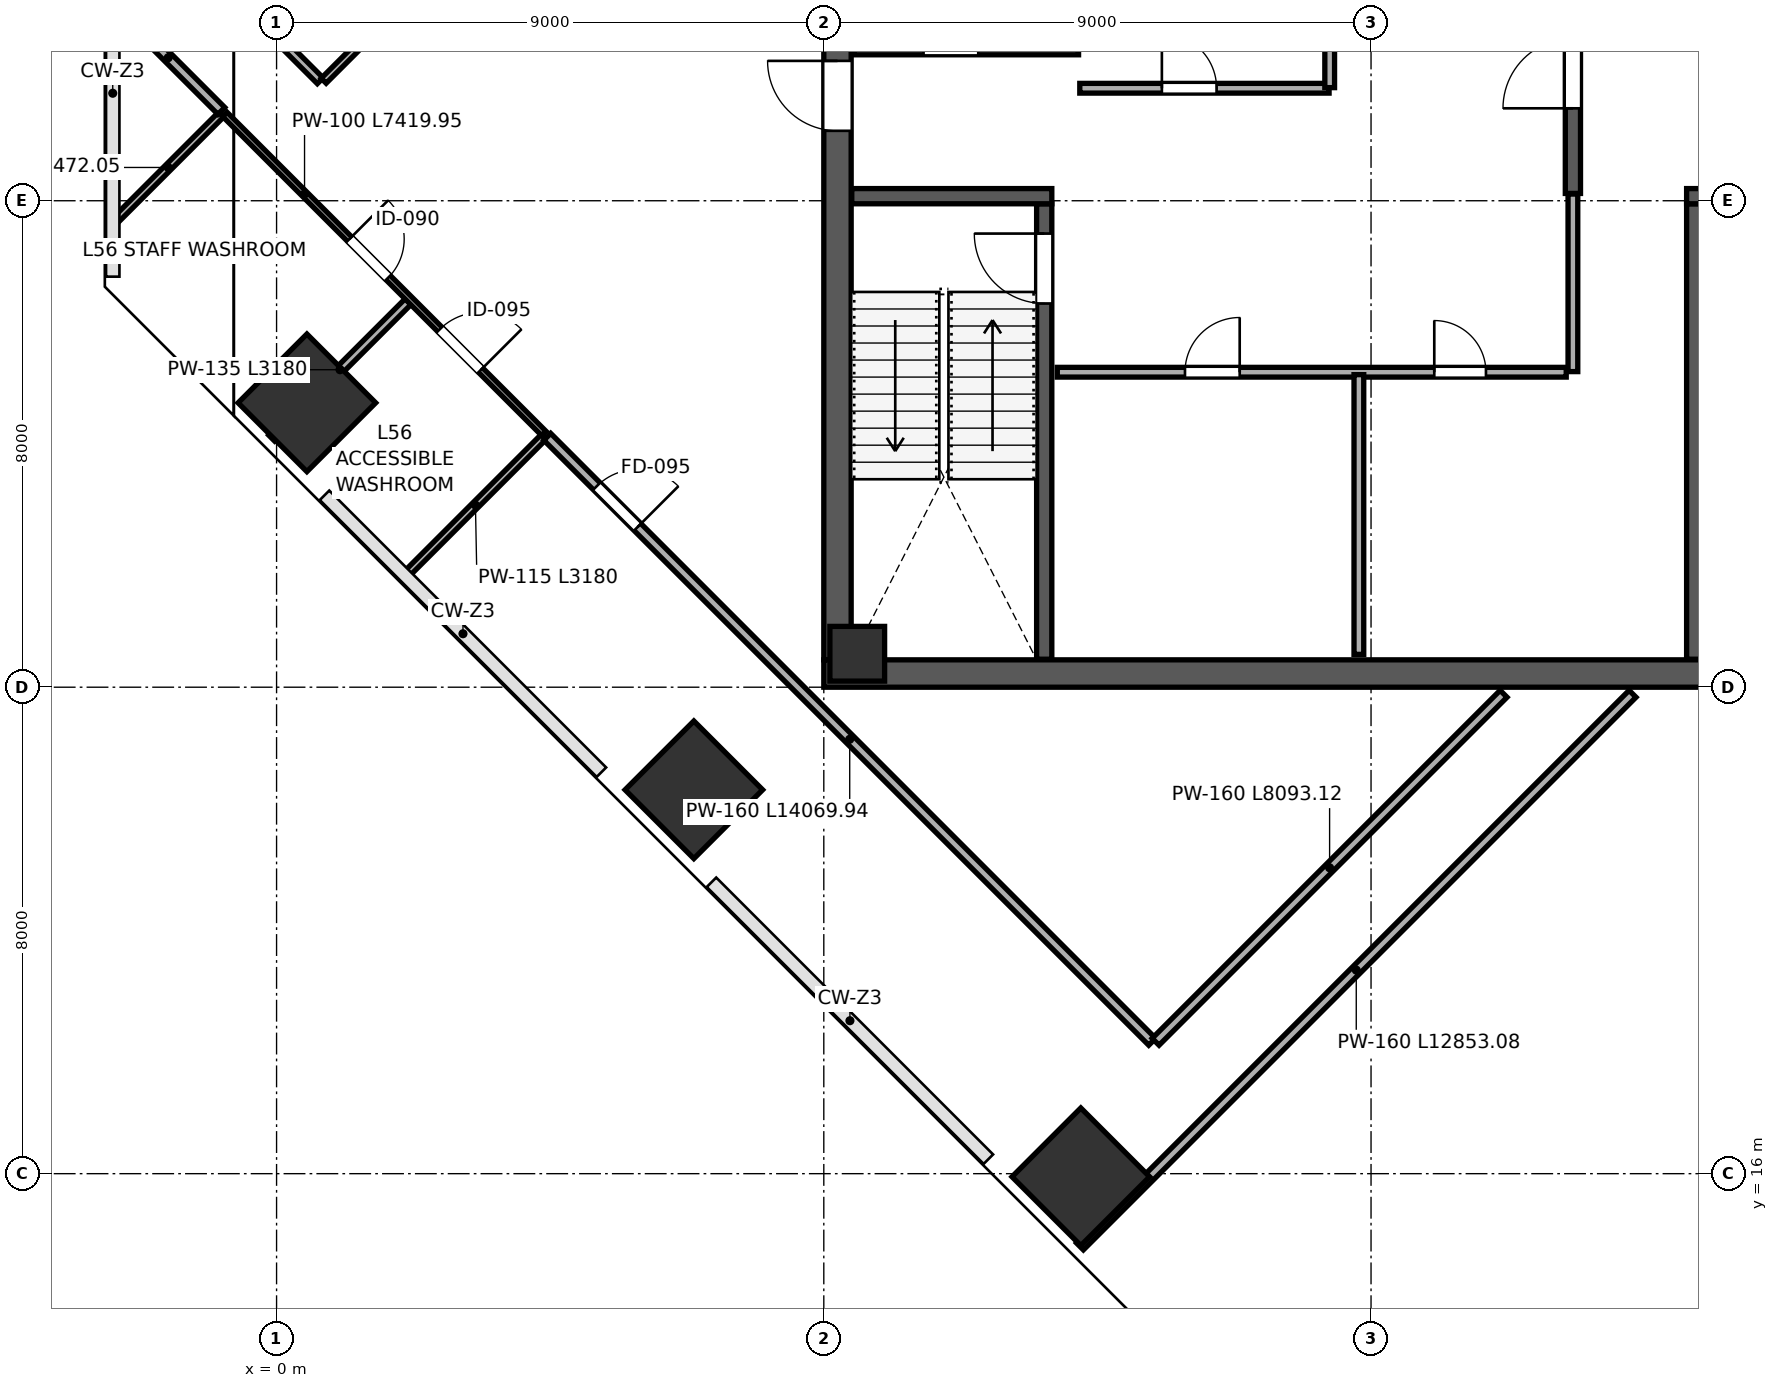
"""IFC4 building model, lengths in metres.
Left out: names, types, materials, properties, quantities, classifications, styles, units other than length and angle.
Written with IfcOpenShell. Run it as: python <this file> out.ifc"""

import sys

from ifc_helpers import new_model, si_unit, direction, frame, frame_2d, origin, origin_2d, place, context, subcontext, project, spatial, rectangle, extrude, source, transform, mapped, element, fill, save


model = new_model("IFC4")
c1 = context("Model", 3, precision=1e-05, world=origin(), true_north=direction((0.0, 1.0)))
c2 = subcontext(c1, "Body", "Model", "MODEL_VIEW")
j1 = project(units=[si_unit("LENGTHUNIT", "METRE"), si_unit("PLANEANGLEUNIT", "RADIAN")], contexts=[c1])
p1 = place(None, origin())
s1 = spatial("IfcSite", under=j1, at=p1, CompositionType="ELEMENT")
p2 = place(p1, origin())
s2 = spatial("IfcBuilding", under=s1, at=p2, CompositionType="ELEMENT")
p3 = place(p2, frame((0.0, 0.0, 250.0)))
s3 = spatial("IfcBuildingStorey", under=s2, at=p3, CompositionType="ELEMENT", Elevation=250.0)
m1 = source(origin(), c2, "Body", "SweptSolid", [
    extrude(rectangle(XDim=0.9, YDim=0.9, at=origin_2d()), origin(), (0.0, 0.0, 1.0), 4.198),
])
p4 = place(p3, frame((9.55, 24.55, 0.001), z_axis=(0.0, 0.0, 1.0), x_axis=(1.0, 0.0, 0.0)))
e1 = element("IfcColumn", 1, at=p4, inside=s3, PredefinedType="COLUMN", context=c2, shape_type="MappedRepresentation", body=[
    mapped(m1, transform((0.0, 0.0, 0.0), scale=1.0)),
])
m2 = source(origin(), c2, "Body", "SweptSolid", [
    extrude(rectangle(XDim=1.6, YDim=1.6, at=origin_2d()), origin(), (0.0, 0.0, 1.0), 4.198),
])
for number, where, z_axis, x_axis in (
    (2, (0.499, 28.677, 0.001), (0.0, 0.0, 1.0), (-0.707, 0.707, 0.0)),
    (3, (6.863, 22.312, 0.001), (0.0, 0.0, 1.0), (-0.707, 0.707, 0.0)),
    (4, (13.227, 15.949, 0.001), (0.0, 0.0, 1.0), (-0.707, 0.707, 0.0)),
):
    element("IfcColumn", number, at=place(p3, frame(where, z_axis=z_axis, x_axis=x_axis)), inside=s3, PredefinedType="COLUMN", context=c2, shape_type="MappedRepresentation", body=[
        mapped(m2, transform((0.0, 0.0, 0.0), scale=1.0)),
    ])
p5 = place(p3, frame((9.225, 24.45, 0.0), z_axis=(0.0, 0.0, 1.0), x_axis=(0.0, 1.0, 0.0)))
e5 = element("IfcWall", 5, at=p5, inside=s3, PredefinedType="SHEAR", context=c2, shape_type="SweptSolid", body=[
    extrude(rectangle(XDim=15.1, YDim=0.45, at=frame_2d((7.55, 0.0))), origin(), (0.0, 0.0, 1.0), 3.96),
])
p6 = place(p5, frame((8.7, 0.0, 0.0)))
e6 = element("IfcOpeningElement", 6, at=p6, cuts=e5, PredefinedType="OPENING", context=c2, shape_type="SweptSolid", body=[
    extrude(rectangle(XDim=1.15, YDim=2.2, at=frame_2d((0.575, 1.1))), frame((0.0, 0.235, 0.0), z_axis=(0.0, -1.0, 0.0), x_axis=(1.0, 0.0, 0.0)), (0.0, 0.0, 1.0), 0.47),
])
p7 = place(p3, frame((9.0, 24.225, 0.0), z_axis=(0.0, 0.0, 1.0), x_axis=(1.0, 0.0, 0.0)))
e7 = element("IfcWall", 7, at=p7, inside=s3, PredefinedType="SHEAR", context=c2, shape_type="SweptSolid", body=[
    extrude(rectangle(XDim=18.0, YDim=0.45, at=frame_2d((9.0, 0.0))), origin(), (0.0, 0.0, 1.0), 3.96),
])
p8 = place(p3, frame((12.625, 24.46, 0.0), z_axis=(0.0, 0.0, 1.0), x_axis=(0.0, 1.0, 0.0)))
e8 = element("IfcWall", 8, at=p8, inside=s3, PredefinedType="SHEAR", context=c2, shape_type="SweptSolid", body=[
    extrude(rectangle(XDim=7.49, YDim=0.25, at=frame_2d((3.745, 0.0))), origin(), (0.0, 0.0, 1.0), 3.96),
])
p9 = place(p8, frame((5.85, 0.0, 0.0)))
e9 = element("IfcOpeningElement", 9, at=p9, cuts=e8, PredefinedType="OPENING", context=c2, shape_type="SweptSolid", body=[
    extrude(rectangle(XDim=1.15, YDim=2.2, at=frame_2d((0.575, 1.1))), frame((0.0, 0.135, 0.0), z_axis=(0.0, -1.0, 0.0), x_axis=(1.0, 0.0, 0.0)), (0.0, 0.0, 1.0), 0.27),
])
p10 = place(p3, frame((9.46, 32.075, 0.0), z_axis=(0.0, 0.0, 1.0), x_axis=(1.0, 0.0, 0.0)))
e10 = element("IfcWall", 10, at=p10, inside=s3, PredefinedType="SHEAR", context=c2, shape_type="SweptSolid", body=[
    extrude(rectangle(XDim=3.29, YDim=0.25, at=frame_2d((1.645, 0.0))), origin(), (0.0, 0.0, 1.0), 3.96),
])
p11 = place(p3, frame((23.315, 24.46, 0.0), z_axis=(0.0, 0.0, 1.0), x_axis=(0.0, 1.0, 0.0)))
e11 = element("IfcWall", 11, at=p11, inside=s3, PredefinedType="SHEAR", context=c2, shape_type="SweptSolid", body=[
    extrude(rectangle(XDim=7.49, YDim=0.25, at=frame_2d((3.745, 0.0))), origin(), (0.0, 0.0, 1.0), 3.96),
])
p12 = place(p3, frame((23.19, 32.075, 0.0), z_axis=(0.0, 0.0, 1.0), x_axis=(1.0, 0.0, 0.0)))
e12 = element("IfcWall", 12, at=p12, inside=s3, PredefinedType="SHEAR", context=c2, shape_type="SweptSolid", body=[
    extrude(rectangle(XDim=3.35, YDim=0.25, at=frame_2d((1.675, 0.0))), origin(), (0.0, 0.0, 1.0), 3.96),
])
p13 = place(p12, frame((0.85, 0.0, 0.0)))
e13 = element("IfcOpeningElement", 13, at=p13, cuts=e12, PredefinedType="OPENING", context=c2, shape_type="SweptSolid", body=[
    extrude(rectangle(XDim=1.15, YDim=2.2, at=frame_2d((0.575, 1.1))), frame((0.0, 0.135, 0.0), z_axis=(0.0, -1.0, 0.0), x_axis=(1.0, 0.0, 0.0)), (0.0, 0.0, 1.0), 0.27),
])
p14 = place(p3, frame((21.32, 32.12, 0.0), z_axis=(0.0, 0.0, 1.0), x_axis=(0.0, 1.0, 0.0)))
e14 = element("IfcWall", 14, at=p14, inside=s3, PredefinedType="SHEAR", context=c2, shape_type="SweptSolid", body=[
    extrude(rectangle(XDim=7.42, YDim=0.25, at=frame_2d((3.71, 0.0))), origin(), (0.0, 0.0, 1.0), 3.96),
])
p15 = place(p14, frame((1.4, 0.0, 0.0)))
e15 = element("IfcOpeningElement", 15, at=p15, cuts=e14, PredefinedType="OPENING", context=c2, shape_type="SweptSolid", body=[
    extrude(rectangle(XDim=1.15, YDim=2.2, at=frame_2d((0.575, 1.1))), frame((0.0, 0.135, 0.0), z_axis=(0.0, -1.0, 0.0), x_axis=(1.0, 0.0, 0.0)), (0.0, 0.0, 1.0), 0.27),
])
p16 = place(p3, frame((9.49, 34.48, 0.0), z_axis=(0.0, 0.0, 1.0), x_axis=(1.0, 0.0, 0.0)))
e16 = element("IfcWall", 16, at=p16, inside=s3, PredefinedType="PARTITIONING", context=c2, shape_type="SweptSolid", body=[
    extrude(rectangle(XDim=3.7, YDim=0.16, at=frame_2d((1.85, 0.0))), origin(), (0.0, 0.0, 1.0), 3.96),
])
p17 = place(p16, frame((1.15, 0.0, 0.0)))
e17 = element("IfcOpeningElement", 17, at=p17, cuts=e16, PredefinedType="OPENING", context=c2, shape_type="SweptSolid", body=[
    extrude(rectangle(XDim=0.9, YDim=2.15, at=frame_2d((0.45, 1.075))), frame((0.0, 0.09, 0.0), z_axis=(0.0, -1.0, 0.0), x_axis=(1.0, 0.0, 0.0)), (0.0, 0.0, 1.0), 0.18),
])
p18 = place(p3, frame((13.21, 33.85, 0.0), z_axis=(0.0, 0.0, 1.0), x_axis=(1.0, 0.0, 0.0)))
e18 = element("IfcWall", 18, at=p18, inside=s3, PredefinedType="PARTITIONING", context=c2, shape_type="SweptSolid", body=[
    extrude(rectangle(XDim=4.1, YDim=0.16, at=frame_2d((2.05, 0.0))), origin(), (0.0, 0.0, 1.0), 3.96),
])
p19 = place(p18, frame((1.35, 0.0, 0.0)))
e19 = element("IfcOpeningElement", 19, at=p19, cuts=e18, PredefinedType="OPENING", context=c2, shape_type="SweptSolid", body=[
    extrude(rectangle(XDim=0.9, YDim=2.15, at=frame_2d((0.45, 1.075))), frame((0.0, 0.09, 0.0), z_axis=(0.0, -1.0, 0.0), x_axis=(1.0, 0.0, 0.0)), (0.0, 0.0, 1.0), 0.18),
])
p20 = place(p3, frame((17.32, 33.86, 0.0), z_axis=(0.0, 0.0, 1.0), x_axis=(0.0, 1.0, 0.0)))
e20 = element("IfcWall", 20, at=p20, inside=s3, PredefinedType="PARTITIONING", context=c2, shape_type="SweptSolid", body=[
    extrude(rectangle(XDim=1.93, YDim=0.16, at=frame_2d((0.965, 0.0))), origin(), (0.0, 0.0, 1.0), 3.96),
])
p21 = place(p3, frame((12.84, 29.18, 0.0), z_axis=(0.0, 0.0, 1.0), x_axis=(1.0, 0.0, 0.0)))
e21 = element("IfcWall", 21, at=p21, inside=s3, PredefinedType="PARTITIONING", context=c2, shape_type="SweptSolid", body=[
    extrude(rectangle(XDim=8.37, YDim=0.16, at=frame_2d((4.185, 0.0))), origin(), (0.0, 0.0, 1.0), 3.96),
])
p22 = place(p21, frame((2.1, 0.0, 0.0)))
e22 = element("IfcOpeningElement", 22, at=p22, cuts=e21, PredefinedType="OPENING", context=c2, shape_type="SweptSolid", body=[
    extrude(rectangle(XDim=0.9, YDim=2.15, at=frame_2d((0.45, 1.075))), frame((0.0, 0.09, 0.0), z_axis=(0.0, -1.0, 0.0), x_axis=(1.0, 0.0, 0.0)), (0.0, 0.0, 1.0), 0.18),
])
p23 = place(p21, frame((6.2, 0.0, 0.0)))
e23 = element("IfcOpeningElement", 23, at=p23, cuts=e21, PredefinedType="OPENING", context=c2, shape_type="SweptSolid", body=[
    extrude(rectangle(XDim=0.85, YDim=2.1, at=frame_2d((0.425, 1.05))), frame((0.0, 0.09, 0.0), z_axis=(0.0, -1.0, 0.0), x_axis=(1.0, 0.0, 0.0)), (0.0, 0.0, 1.0), 0.18),
])
p24 = place(p3, frame((17.8, 24.54, 0.0), z_axis=(0.0, 0.0, 1.0), x_axis=(0.0, 1.0, 0.0)))
e24 = element("IfcWall", 24, at=p24, inside=s3, PredefinedType="PARTITIONING", context=c2, shape_type="SweptSolid", body=[
    extrude(rectangle(XDim=4.6, YDim=0.16, at=frame_2d((2.3, 0.0))), origin(), (0.0, 0.0, 1.0), 3.96),
])
p25 = place(p3, frame((21.32, 29.19, 0.0), z_axis=(0.0, 0.0, 1.0), x_axis=(0.0, 1.0, 0.0)))
e25 = element("IfcWall", 25, at=p25, inside=s3, PredefinedType="PARTITIONING", context=c2, shape_type="SweptSolid", body=[
    extrude(rectangle(XDim=2.92, YDim=0.16, at=frame_2d((1.46, 0.0))), origin(), (0.0, 0.0, 1.0), 3.96),
])
p26 = place(p3, frame((-2.656, 31.673, 0.0), z_axis=(0.0, 0.0, 1.0), x_axis=(0.707106781187, 0.707106781187, 0.0)))
e26 = element("IfcWall", 26, at=p26, inside=s3, PredefinedType="PARTITIONING", context=c2, shape_type="SweptSolid", body=[
    extrude(rectangle(XDim=2.472, YDim=0.115, at=frame_2d((1.236, 0.0))), origin(), (0.0, 0.0, 1.0), 3.96),
])
p27 = place(p3, frame((-2.656, 35.226, 0.0), z_axis=(0.0, 0.0, 1.0), x_axis=(0.707106781187, -0.707106781187, 0.0)))
e27 = element("IfcWall", 27, at=p27, inside=s3, PredefinedType="PARTITIONING", context=c2, shape_type="SweptSolid", body=[
    extrude(rectangle(XDim=2.472, YDim=0.16, at=frame_2d((1.236, 0.0))), origin(), (0.0, 0.0, 1.0), 3.96),
])
p28 = place(p3, frame((-0.081, 28.097, 0.0), z_axis=(0.0, 0.0, 1.0), x_axis=(0.707068394238, 0.707145166051, 0.0)))
e28 = element("IfcWall", 28, at=p28, inside=s3, PredefinedType="PARTITIONING", context=c2, shape_type="SweptSolid", body=[
    extrude(rectangle(XDim=3.18, YDim=0.135, at=frame_2d((1.59, 0.0))), origin(), (0.0, 0.0, 1.0), 3.195),
])
p29 = place(p3, frame((2.146, 25.869, 0.0), z_axis=(0.0, 0.0, 1.0), x_axis=(0.707106781187, 0.707106781187, 0.0)))
e29 = element("IfcWall", 29, at=p29, inside=s3, PredefinedType="PARTITIONING", context=c2, shape_type="SweptSolid", body=[
    extrude(rectangle(XDim=3.18, YDim=0.115, at=frame_2d((1.59, 0.0))), origin(), (0.0, 0.0, 1.0), 3.195),
])
p30 = place(p3, frame((-0.852, 33.421, 0.0), z_axis=(0.0, 0.0, 1.0), x_axis=(0.707090329382, -0.707123232608, 0.0)))
e30 = element("IfcWall", 30, at=p30, inside=s3, PredefinedType="PARTITIONING", context=c2, shape_type="SweptSolid", body=[
    extrude(rectangle(XDim=7.42, YDim=0.1, at=frame_2d((3.71, 0.0))), origin(), (0.0, 0.0, 1.0), 3.96),
])
p31 = place(p30, frame((2.9, 0.0, 0.0)))
e31 = element("IfcOpeningElement", 31, at=p31, cuts=e30, PredefinedType="OPENING", context=c2, shape_type="SweptSolid", body=[
    extrude(rectangle(XDim=0.9, YDim=2.15, at=frame_2d((0.45, 1.075))), frame((0.0, 0.06, 0.0), z_axis=(0.0, -1.0, 0.0), x_axis=(1.0, 0.0, 0.0)), (0.0, 0.0, 1.0), 0.12),
])
p32 = place(p30, frame((5.0, 0.0, 0.0)))
e32 = element("IfcOpeningElement", 32, at=p32, cuts=e30, PredefinedType="OPENING", context=c2, shape_type="SweptSolid", body=[
    extrude(rectangle(XDim=0.95, YDim=2.15, at=frame_2d((0.475, 1.075))), frame((0.0, 0.06, 0.0), z_axis=(0.0, -1.0, 0.0), x_axis=(1.0, 0.0, 0.0)), (0.0, 0.0, 1.0), 0.12),
])
p33 = place(p3, frame((4.452, 28.118, 0.0), z_axis=(0.0, 0.0, 1.0), x_axis=(0.707106781187, -0.707106781187, 0.0)))
e33 = element("IfcWall", 33, at=p33, inside=s3, PredefinedType="PARTITIONING", context=c2, shape_type="SweptSolid", body=[
    extrude(rectangle(XDim=14.07, YDim=0.16, at=frame_2d((7.035, 0.0))), origin(), (0.0, 0.0, 1.0), 3.96),
])
p34 = place(p33, frame((1.15, 0.0, 0.0)))
e34 = element("IfcOpeningElement", 34, at=p34, cuts=e33, PredefinedType="OPENING", context=c2, shape_type="SweptSolid", body=[
    extrude(rectangle(XDim=0.95, YDim=2.15, at=frame_2d((0.475, 1.075))), frame((0.0, 0.09, 0.0), z_axis=(0.0, -1.0, 0.0), x_axis=(1.0, 0.0, 0.0)), (0.0, 0.0, 1.0), 0.18),
])
p35 = place(p3, frame((14.457, 18.169, 0.0), z_axis=(0.0, 0.0, 1.0), x_axis=(0.707106781187, 0.707106781187, 0.0)))
e35 = element("IfcWall", 35, at=p35, inside=s3, PredefinedType="PARTITIONING", context=c2, shape_type="SweptSolid", body=[
    extrude(rectangle(XDim=8.093, YDim=0.16, at=frame_2d((4.046, 0.0))), origin(), (0.0, 0.0, 1.0), 3.96),
])
p36 = place(p3, frame((-2.414, 37.105, 0.0), z_axis=(0.0, 0.0, 1.0), x_axis=(0.707106781187, -0.707106781187, 0.0)))
e36 = element("IfcWall", 36, at=p36, inside=s3, PredefinedType="PARTITIONING", context=c2, shape_type="SweptSolid", body=[
    extrude(rectangle(XDim=4.43, YDim=0.135, at=frame_2d((2.215, 0.0))), origin(), (0.0, 0.0, 1.0), 3.96),
])
p37 = place(p3, frame((0.775, 33.973, 0.0), z_axis=(0.0, 0.0, 1.0), x_axis=(0.707106781187, 0.707106781187, 0.0)))
e37 = element("IfcWall", 37, at=p37, inside=s3, PredefinedType="PARTITIONING", context=c2, shape_type="SweptSolid", body=[
    extrude(rectangle(XDim=29.28, YDim=0.115, at=frame_2d((14.64, 0.0))), origin(), (0.0, 0.0, 1.0), 3.96),
])
p38 = place(p37, frame((2.2, 0.0, 0.0)))
e38 = element("IfcOpeningElement", 38, at=p38, cuts=e37, PredefinedType="OPENING", context=c2, shape_type="SweptSolid", body=[
    extrude(rectangle(XDim=0.95, YDim=2.15, at=frame_2d((0.475, 1.075))), frame((0.0, 0.067, 0.0), z_axis=(0.0, -1.0, 0.0), x_axis=(1.0, 0.0, 0.0)), (0.0, 0.0, 1.0), 0.135),
])
p39 = place(p3, frame((13.213, 14.803, 0.0), z_axis=(0.0, 0.0, 1.0), x_axis=(0.707116278481, 0.707097283765, 0.0)))
e39 = element("IfcWall", 39, at=p39, inside=s3, PredefinedType="PARTITIONING", context=c2, shape_type="SweptSolid", body=[
    extrude(rectangle(XDim=12.853, YDim=0.16, at=frame_2d((6.427, 0.0))), origin(), (0.0, 0.0, 1.0), 3.96),
])
m3 = source(origin(), c2, "Body", "SweptSolid", [
    extrude(rectangle(XDim=1.15, YDim=2.2, at=frame_2d((0.575, 1.1))), frame((0.0, 0.025, 0.0), z_axis=(0.0, -1.0, 0.0), x_axis=(1.0, 0.0, 0.0)), (0.0, 0.0, 1.0), 0.05),
])
p40 = place(p9, origin())
e40 = element("IfcDoor", 40, at=p40, inside=s3, OperationType="SINGLE_SWING_RIGHT", PredefinedType="DOOR", context=c2, shape_type="MappedRepresentation", body=[
    mapped(m3, transform((0.0, 0.0, 0.0), scale=1.0)),
])
fill(e9, e40)
m4 = source(origin(), c2, "Body", "SweptSolid", [
    extrude(rectangle(XDim=1.15, YDim=2.2, at=frame_2d((0.575, 1.1))), frame((0.0, 0.025, 0.0), z_axis=(0.0, -1.0, 0.0), x_axis=(1.0, 0.0, 0.0)), (0.0, 0.0, 1.0), 0.05),
])
p41 = place(p15, origin())
e41 = element("IfcDoor", 41, at=p41, inside=s3, OperationType="SINGLE_SWING_LEFT", PredefinedType="DOOR", context=c2, shape_type="MappedRepresentation", body=[
    mapped(m4, transform((0.0, 0.0, 0.0), scale=1.0)),
])
fill(e15, e41)
p42 = place(p6, origin())
e42 = element("IfcDoor", 42, at=p42, inside=s3, OperationType="SINGLE_SWING_RIGHT", PredefinedType="DOOR", context=c2, shape_type="MappedRepresentation", body=[
    mapped(m4, transform((0.0, 0.0, 0.0), scale=1.0)),
])
fill(e6, e42)
m5 = source(origin(), c2, "Body", "SweptSolid", [
    extrude(rectangle(XDim=0.9, YDim=2.15, at=frame_2d((0.45, 1.075))), frame((0.0, 0.025, 0.0), z_axis=(0.0, -1.0, 0.0), x_axis=(1.0, 0.0, 0.0)), (0.0, 0.0, 1.0), 0.05),
])
p43 = place(p19, origin())
e43 = element("IfcDoor", 43, at=p43, inside=s3, OperationType="SINGLE_SWING_LEFT", PredefinedType="DOOR", context=c2, shape_type="MappedRepresentation", body=[
    mapped(m5, transform((0.0, 0.0, 0.0), scale=1.0)),
])
fill(e19, e43)
p44 = place(p22, origin())
e44 = element("IfcDoor", 44, at=p44, inside=s3, OperationType="SINGLE_SWING_RIGHT", PredefinedType="DOOR", context=c2, shape_type="MappedRepresentation", body=[
    mapped(m5, transform((0.0, 0.0, 0.0), scale=1.0)),
])
fill(e22, e44)
m6 = source(origin(), c2, "Body", "SweptSolid", [
    extrude(rectangle(XDim=0.85, YDim=2.1, at=frame_2d((0.425, 1.05))), frame((0.0, 0.025, 0.0), z_axis=(0.0, -1.0, 0.0), x_axis=(1.0, 0.0, 0.0)), (0.0, 0.0, 1.0), 0.05),
])
p45 = place(p23, origin())
e45 = element("IfcDoor", 45, at=p45, inside=s3, OperationType="SINGLE_SWING_LEFT", PredefinedType="DOOR", context=c2, shape_type="MappedRepresentation", body=[
    mapped(m6, transform((0.0, 0.0, 0.0), scale=1.0)),
])
fill(e23, e45)
m7 = source(origin(), c2, "Body", "SweptSolid", [
    extrude(rectangle(XDim=0.9, YDim=2.15, at=frame_2d((0.45, 1.075))), frame((0.0, 0.025, 0.0), z_axis=(0.0, -1.0, 0.0), x_axis=(1.0, 0.0, 0.0)), (0.0, 0.0, 1.0), 0.05),
])
p46 = place(p31, origin())
e46 = element("IfcDoor", 46, at=p46, inside=s3, OperationType="SINGLE_SWING_LEFT", PredefinedType="DOOR", context=c2, shape_type="MappedRepresentation", body=[
    mapped(m7, transform((0.0, 0.0, 0.0), scale=1.0)),
])
fill(e31, e46)
m8 = source(origin(), c2, "Body", "SweptSolid", [
    extrude(rectangle(XDim=0.95, YDim=2.15, at=frame_2d((0.475, 1.075))), frame((0.0, 0.025, 0.0), z_axis=(0.0, -1.0, 0.0), x_axis=(1.0, 0.0, 0.0)), (0.0, 0.0, 1.0), 0.05),
])
p47 = place(p32, origin())
e47 = element("IfcDoor", 47, at=p47, inside=s3, OperationType="SINGLE_SWING_RIGHT", PredefinedType="DOOR", context=c2, shape_type="MappedRepresentation", body=[
    mapped(m8, transform((0.0, 0.0, 0.0), scale=1.0)),
])
fill(e32, e47)
m9 = source(origin(), c2, "Body", "SweptSolid", [
    extrude(rectangle(XDim=0.95, YDim=2.15, at=frame_2d((0.475, 1.075))), frame((0.0, 0.025, 0.0), z_axis=(0.0, -1.0, 0.0), x_axis=(1.0, 0.0, 0.0)), (0.0, 0.0, 1.0), 0.05),
])
p48 = place(p34, origin())
e48 = element("IfcDoor", 48, at=p48, inside=s3, OperationType="SINGLE_SWING_RIGHT", PredefinedType="DOOR", context=c2, shape_type="MappedRepresentation", body=[
    mapped(m9, transform((0.0, 0.0, 0.0), scale=1.0)),
])
fill(e34, e48)
save(model, sys.argv[1])
